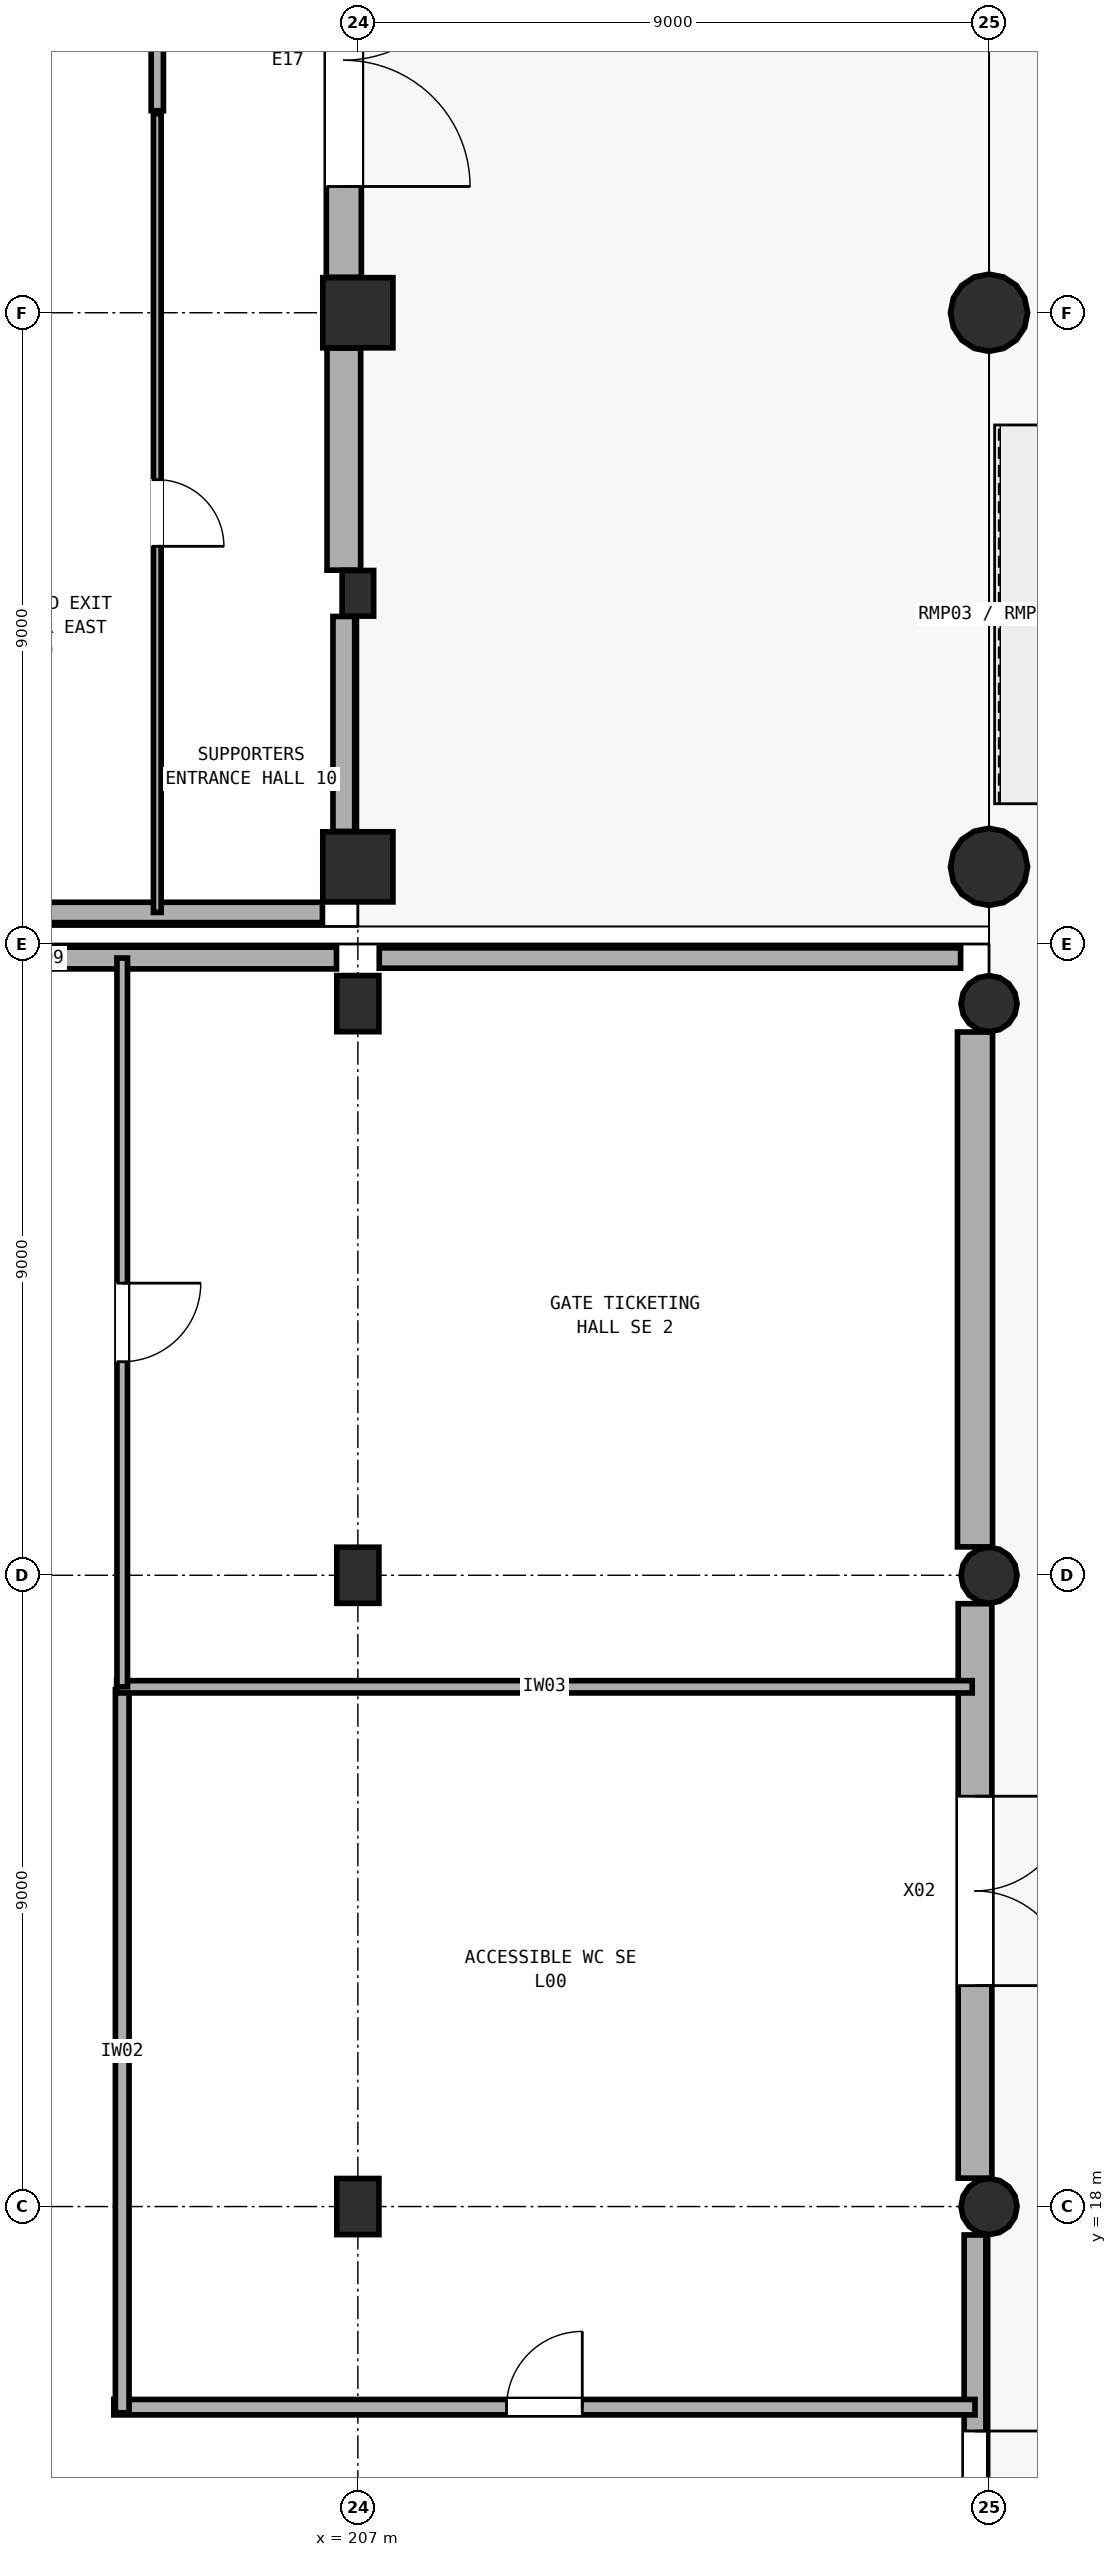
"""IFC4 building model, lengths in metres.
Left out: names, types, materials, properties, quantities, classifications, styles, units other than length and angle.
Written with IfcOpenShell. Run it as: python <this file> out.ifc"""

import sys

from ifc_helpers import new_model, si_unit, direction, frame, frame_2d, origin, origin_2d, place, context, subcontext, project, spatial, rectangle, circle, extrude, element, fill, save


model = new_model("IFC4")
c1 = context("Model", 3, precision=1e-05, world=origin(), true_north=direction((0.0, 1.0)))
c2 = subcontext(c1, "Body", "Model", "MODEL_VIEW")
j1 = project(units=[si_unit("LENGTHUNIT", "METRE"), si_unit("PLANEANGLEUNIT", "RADIAN")], contexts=[c1])
p1 = place(None, origin())
s1 = spatial("IfcSite", under=j1, at=p1, CompositionType="ELEMENT")
p2 = place(p1, origin())
s2 = spatial("IfcBuilding", under=s1, at=p2, CompositionType="ELEMENT")
p3 = place(p2, origin())
s3 = spatial("IfcBuildingStorey", under=s2, at=p3, CompositionType="ELEMENT", Elevation=0.0)
for number, where, z_axis, x_axis in (
    (1, (207.0, 37.1, 0.0), (0.0, 0.0, 1.0), (1.0, 0.0, 0.0)),
    (2, (207.0, 45.0, 0.0), (0.0, 0.0, 1.0), (1.0, 0.0, 0.0)),
):
    element("IfcColumn", number, at=place(p3, frame(where, z_axis=z_axis, x_axis=x_axis)), inside=s3, PredefinedType="COLUMN", context=c2, shape_type="SweptSolid", body=[
        extrude(rectangle(XDim=1.0, YDim=1.0, at=origin_2d()), origin(), (0.0, 0.0, 1.0), 4.8),
    ])
for number, where, z_axis, x_axis in (
    (3, (216.0, 37.1, 0.0), (0.0, 0.0, 1.0), (1.0, 0.0, 0.0)),
    (4, (216.0, 45.0, 0.0), (0.0, 0.0, 1.0), (1.0, 0.0, 0.0)),
):
    element("IfcColumn", number, at=place(p3, frame(where, z_axis=z_axis, x_axis=x_axis)), inside=s3, PredefinedType="COLUMN", context=c2, shape_type="SweptSolid", body=[
        extrude(circle(Radius=0.55, at=origin_2d()), origin(), (0.0, 0.0, 1.0), 4.8),
    ])
for number, where, z_axis, x_axis in (
    (5, (207.0, 18.0, 0.0), (0.0, 0.0, 1.0), (1.0, 0.0, 0.0)),
    (6, (207.0, 27.0, 0.0), (0.0, 0.0, 1.0), (1.0, 0.0, 0.0)),
    (7, (207.0, 35.15, 0.0), (0.0, 0.0, 1.0), (1.0, 0.0, 0.0)),
):
    element("IfcColumn", number, at=place(p3, frame(where, z_axis=z_axis, x_axis=x_axis)), inside=s3, PredefinedType="COLUMN", context=c2, shape_type="SweptSolid", body=[
        extrude(rectangle(XDim=0.6, YDim=0.8, at=origin_2d()), origin(), (0.0, 0.0, 1.0), 4.8),
    ])
for number, where, z_axis, x_axis in (
    (8, (216.0, 18.0, 0.0), (0.0, 0.0, 1.0), (1.0, 0.0, 0.0)),
    (9, (216.0, 27.0, 0.0), (0.0, 0.0, 1.0), (1.0, 0.0, 0.0)),
    (10, (216.0, 35.15, 0.0), (0.0, 0.0, 1.0), (1.0, 0.0, 0.0)),
):
    element("IfcColumn", number, at=place(p3, frame(where, z_axis=z_axis, x_axis=x_axis)), inside=s3, PredefinedType="COLUMN", context=c2, shape_type="SweptSolid", body=[
        extrude(circle(Radius=0.4, at=origin_2d()), origin(), (0.0, 0.0, 1.0), 4.8),
    ])
p4 = place(p3, frame((207.0, 41.0, 0.0), z_axis=(0.0, 0.0, 1.0), x_axis=(1.0, 0.0, 0.0)))
e11 = element("IfcColumn", 11, at=p4, inside=s3, PredefinedType="PILASTER", context=c2, shape_type="SweptSolid", body=[
    extrude(rectangle(XDim=0.45, YDim=0.65, at=origin_2d()), origin(), (0.0, 0.0, 1.0), 4.8),
])
p5 = place(p3, frame((206.8, 51.695, 0.0), z_axis=(0.0, 0.0, 1.0), x_axis=(0.0, -1.0, 0.0)))
e12 = element("IfcWall", 12, at=p5, inside=s3, PredefinedType="SOLIDWALL", context=c2, shape_type="SweptSolid", body=[
    extrude(rectangle(XDim=6.19, YDim=0.5, at=frame_2d((3.095, 0.0))), origin(), (0.0, 0.0, 1.0), 3.58),
])
p6 = place(p5, frame((1.295, 0.0, 0.0)))
e13 = element("IfcOpeningElement", 13, at=p6, cuts=e12, PredefinedType="OPENING", context=c2, shape_type="SweptSolid", body=[
    extrude(rectangle(XDim=3.6, YDim=2.6, at=frame_2d((1.8, 1.3))), frame((0.0, 0.26, 0.0), z_axis=(0.0, -1.0, 0.0), x_axis=(1.0, 0.0, 0.0)), (0.0, 0.0, 1.0), 0.52),
])
p7 = place(p3, frame((206.8, 44.495, 0.0), z_axis=(0.0, 0.0, 1.0), x_axis=(0.0, -1.0, 0.0)))
e14 = element("IfcWall", 14, at=p7, inside=s3, PredefinedType="SOLIDWALL", context=c2, shape_type="SweptSolid", body=[
    extrude(rectangle(XDim=3.165, YDim=0.48, at=frame_2d((1.583, 0.0))), origin(), (0.0, 0.0, 1.0), 3.28),
])
p8 = place(p3, frame((206.8, 40.67, 0.0), z_axis=(0.0, 0.0, 1.0), x_axis=(0.0, -1.0, 0.0)))
e15 = element("IfcWall", 15, at=p8, inside=s3, PredefinedType="SOLIDWALL", context=c2, shape_type="SweptSolid", body=[
    extrude(rectangle(XDim=3.065, YDim=0.31, at=frame_2d((1.532, 0.0))), origin(), (0.0, 0.0, 1.0), 3.28),
])
p9 = place(p3, frame((206.495, 36.45, 0.0), z_axis=(0.0, 0.0, 1.0), x_axis=(-1.0, 0.0, 0.0)))
e16 = element("IfcWall", 16, at=p9, inside=s3, PredefinedType="SOLIDWALL", context=c2, shape_type="SweptSolid", body=[
    extrude(rectangle(XDim=7.94, YDim=0.29, at=frame_2d((3.97, 0.0))), origin(), (0.0, 0.0, 1.0), 3.28),
])
p10 = place(p3, frame((198.305, 35.8, 0.0), z_axis=(0.0, 0.0, 1.0), x_axis=(1.0, 0.0, 0.0)))
e17 = element("IfcWall", 17, at=p10, inside=s3, PredefinedType="SOLIDWALL", context=c2, shape_type="SweptSolid", body=[
    extrude(rectangle(XDim=8.39, YDim=0.31, at=frame_2d((4.195, 0.0))), origin(), (0.0, 0.0, 1.0), 3.28),
])
p11 = place(p3, frame((207.305, 35.8, 0.0), z_axis=(0.0, 0.0, 1.0), x_axis=(1.0, 0.0, 0.0)))
e18 = element("IfcWall", 18, at=p11, inside=s3, PredefinedType="SOLIDWALL", context=c2, shape_type="SweptSolid", body=[
    extrude(rectangle(XDim=8.29, YDim=0.29, at=frame_2d((4.145, 0.0))), origin(), (0.0, 0.0, 1.0), 3.28),
])
p12 = place(p3, frame((215.8, 34.745, 0.0), z_axis=(0.0, 0.0, 1.0), x_axis=(0.0, -1.0, 0.0)))
e19 = element("IfcWall", 19, at=p12, inside=s3, PredefinedType="SOLIDWALL", context=c2, shape_type="SweptSolid", body=[
    extrude(rectangle(XDim=7.34, YDim=0.5, at=frame_2d((3.67, 0.0))), origin(), (0.0, 0.0, 1.0), 3.28),
])
p13 = place(p3, frame((215.8, 26.595, 0.0), z_axis=(0.0, 0.0, 1.0), x_axis=(0.0, -1.0, 0.0)))
e20 = element("IfcWall", 20, at=p13, inside=s3, PredefinedType="SOLIDWALL", context=c2, shape_type="SweptSolid", body=[
    extrude(rectangle(XDim=8.19, YDim=0.48, at=frame_2d((4.095, 0.0))), origin(), (0.0, 0.0, 1.0), 3.58),
])
p14 = place(p13, frame((2.745, 0.0, 0.0)))
e21 = element("IfcOpeningElement", 21, at=p14, cuts=e20, PredefinedType="OPENING", context=c2, shape_type="SweptSolid", body=[
    extrude(rectangle(XDim=2.7, YDim=2.4, at=frame_2d((1.35, 1.2))), frame((0.0, 0.25, 0.0), z_axis=(0.0, -1.0, 0.0), x_axis=(1.0, 0.0, 0.0)), (0.0, 0.0, 1.0), 0.5),
])
p15 = place(p3, frame((215.8, 17.595, 0.0), z_axis=(0.0, 0.0, 1.0), x_axis=(0.0, -1.0, 0.0)))
e22 = element("IfcWall", 22, at=p15, inside=s3, PredefinedType="SOLIDWALL", context=c2, shape_type="SweptSolid", body=[
    extrude(rectangle(XDim=8.19, YDim=0.31, at=frame_2d((4.095, 0.0))), origin(), (0.0, 0.0, 1.0), 3.58),
])
p16 = place(p15, frame((2.795, 0.0, 0.0)))
e23 = element("IfcOpeningElement", 23, at=p16, cuts=e22, PredefinedType="OPENING", context=c2, shape_type="SweptSolid", body=[
    extrude(rectangle(XDim=2.6, YDim=2.35, at=frame_2d((1.3, 1.175))), frame((0.0, 0.165, 0.0), z_axis=(0.0, -1.0, 0.0), x_axis=(1.0, 0.0, 0.0)), (0.0, 0.0, 1.0), 0.33),
])
p17 = place(p3, frame((204.14, 47.84, 0.0), z_axis=(0.0, 0.0, 1.0), x_axis=(0.0, -1.0, 0.0)))
e24 = element("IfcWall", 24, at=p17, inside=s3, PredefinedType="PARTITIONING", context=c2, shape_type="SweptSolid", body=[
    extrude(rectangle(XDim=11.39, YDim=0.11, at=frame_2d((5.695, 0.0))), origin(), (0.0, 0.0, 1.0), 3.28),
])
p18 = place(p17, frame((5.22, 0.0, 0.0)))
e25 = element("IfcOpeningElement", 25, at=p18, cuts=e24, PredefinedType="OPENING", context=c2, shape_type="SweptSolid", body=[
    extrude(rectangle(XDim=0.95, YDim=2.18, at=frame_2d((0.475, 1.09))), frame((0.0, 0.065, 0.0), z_axis=(0.0, -1.0, 0.0), x_axis=(1.0, 0.0, 0.0)), (0.0, 0.0, 1.0), 0.13),
])
p19 = place(p3, frame((204.14, 47.88, 0.0), z_axis=(0.0, 0.0, 1.0), x_axis=(0.0, 1.0, 0.0)))
e26 = element("IfcWall", 26, at=p19, inside=s3, PredefinedType="PARTITIONING", context=c2, shape_type="SweptSolid", body=[
    extrude(rectangle(XDim=11.31, YDim=0.175, at=frame_2d((5.655, 0.0))), origin(), (0.0, 0.0, 1.0), 3.28),
])
p20 = place(p3, frame((203.52, 15.14, 0.0), z_axis=(0.0, 0.0, 1.0), x_axis=(1.0, 0.0, 0.0)))
e27 = element("IfcWall", 27, at=p20, inside=s3, PredefinedType="PARTITIONING", context=c2, shape_type="SweptSolid", body=[
    extrude(rectangle(XDim=12.28, YDim=0.22, at=frame_2d((6.14, 0.0))), origin(), (0.0, 0.0, 1.0), 3.28),
])
p21 = place(p20, frame((5.6, 0.0, 0.0)))
e28 = element("IfcOpeningElement", 28, at=p21, cuts=e27, PredefinedType="OPENING", context=c2, shape_type="SweptSolid", body=[
    extrude(rectangle(XDim=1.08, YDim=2.18, at=frame_2d((0.54, 1.09))), frame((0.0, 0.12, 0.0), z_axis=(0.0, -1.0, 0.0), x_axis=(1.0, 0.0, 0.0)), (0.0, 0.0, 1.0), 0.24),
])
p22 = place(p3, frame((203.64, 15.06, 0.0), z_axis=(0.0, 0.0, 1.0), x_axis=(0.0, 1.0, 0.0)))
e29 = element("IfcWall", 29, at=p22, inside=s3, PredefinedType="PARTITIONING", context=c2, shape_type="SweptSolid", body=[
    extrude(rectangle(XDim=10.31, YDim=0.195, at=frame_2d((5.155, 0.0))), origin(), (0.0, 0.0, 1.0), 3.28),
])
p23 = place(p3, frame((203.56, 25.41, 0.0), z_axis=(0.0, 0.0, 1.0), x_axis=(1.0, 0.0, 0.0)))
e30 = element("IfcWall", 30, at=p23, inside=s3, PredefinedType="PARTITIONING", context=c2, shape_type="SweptSolid", body=[
    extrude(rectangle(XDim=12.2, YDim=0.175, at=frame_2d((6.1, 0.0))), origin(), (0.0, 0.0, 1.0), 3.28),
])
p24 = place(p3, frame((203.64, 35.8, 0.0), z_axis=(0.0, 0.0, 1.0), x_axis=(0.0, -1.0, 0.0)))
e31 = element("IfcWall", 31, at=p24, inside=s3, PredefinedType="PARTITIONING", context=c2, shape_type="SweptSolid", body=[
    extrude(rectangle(XDim=10.39, YDim=0.15, at=frame_2d((5.195, 0.0))), origin(), (0.0, 0.0, 1.0), 3.28),
])
p25 = place(p24, frame((4.635, 0.0, 0.0)))
e32 = element("IfcOpeningElement", 32, at=p25, cuts=e31, PredefinedType="OPENING", context=c2, shape_type="SweptSolid", body=[
    extrude(rectangle(XDim=1.12, YDim=2.22, at=frame_2d((0.56, 1.11))), frame((0.0, 0.085, 0.0), z_axis=(0.0, -1.0, 0.0), x_axis=(1.0, 0.0, 0.0)), (0.0, 0.0, 1.0), 0.17),
])
p26 = place(p6, origin())
e33 = element("IfcDoor", 33, at=p26, inside=s3, OperationType="DOUBLE_DOOR_SINGLE_SWING", PredefinedType="DOOR", context=c2, shape_type="SweptSolid", body=[
    extrude(rectangle(XDim=3.6, YDim=2.6, at=frame_2d((1.8, 1.3))), frame((0.0, 0.025, 0.0), z_axis=(0.0, -1.0, 0.0), x_axis=(1.0, 0.0, 0.0)), (0.0, 0.0, 1.0), 0.05),
])
fill(e13, e33)
p27 = place(p14, origin())
e34 = element("IfcDoor", 34, at=p27, inside=s3, OperationType="DOUBLE_DOOR_SINGLE_SWING", PredefinedType="DOOR", context=c2, shape_type="SweptSolid", body=[
    extrude(rectangle(XDim=2.7, YDim=2.4, at=frame_2d((1.35, 1.2))), frame((0.0, 0.025, 0.0), z_axis=(0.0, -1.0, 0.0), x_axis=(1.0, 0.0, 0.0)), (0.0, 0.0, 1.0), 0.05),
])
fill(e21, e34)
p28 = place(p16, origin())
e35 = element("IfcDoor", 35, at=p28, inside=s3, OperationType="DOUBLE_DOOR_SINGLE_SWING", PredefinedType="DOOR", context=c2, shape_type="SweptSolid", body=[
    extrude(rectangle(XDim=2.6, YDim=2.35, at=frame_2d((1.3, 1.175))), frame((0.0, 0.025, 0.0), z_axis=(0.0, -1.0, 0.0), x_axis=(1.0, 0.0, 0.0)), (0.0, 0.0, 1.0), 0.05),
])
fill(e23, e35)
p29 = place(p18, origin())
e36 = element("IfcDoor", 36, at=p29, inside=s3, OperationType="SINGLE_SWING_RIGHT", PredefinedType="DOOR", context=c2, shape_type="SweptSolid", body=[
    extrude(rectangle(XDim=0.95, YDim=2.18, at=frame_2d((0.475, 1.09))), frame((0.0, 0.025, 0.0), z_axis=(0.0, -1.0, 0.0), x_axis=(1.0, 0.0, 0.0)), (0.0, 0.0, 1.0), 0.05),
])
fill(e25, e36)
p30 = place(p21, origin())
e37 = element("IfcDoor", 37, at=p30, inside=s3, OperationType="SINGLE_SWING_RIGHT", PredefinedType="DOOR", context=c2, shape_type="SweptSolid", body=[
    extrude(rectangle(XDim=1.08, YDim=2.18, at=frame_2d((0.54, 1.09))), frame((0.0, 0.025, 0.0), z_axis=(0.0, -1.0, 0.0), x_axis=(1.0, 0.0, 0.0)), (0.0, 0.0, 1.0), 0.05),
])
fill(e28, e37)
p31 = place(p25, origin())
e38 = element("IfcDoor", 38, at=p31, inside=s3, OperationType="SINGLE_SWING_LEFT", PredefinedType="DOOR", context=c2, shape_type="SweptSolid", body=[
    extrude(rectangle(XDim=1.12, YDim=2.22, at=frame_2d((0.56, 1.11))), frame((0.0, 0.025, 0.0), z_axis=(0.0, -1.0, 0.0), x_axis=(1.0, 0.0, 0.0)), (0.0, 0.0, 1.0), 0.05),
])
fill(e32, e38)
save(model, sys.argv[1])
